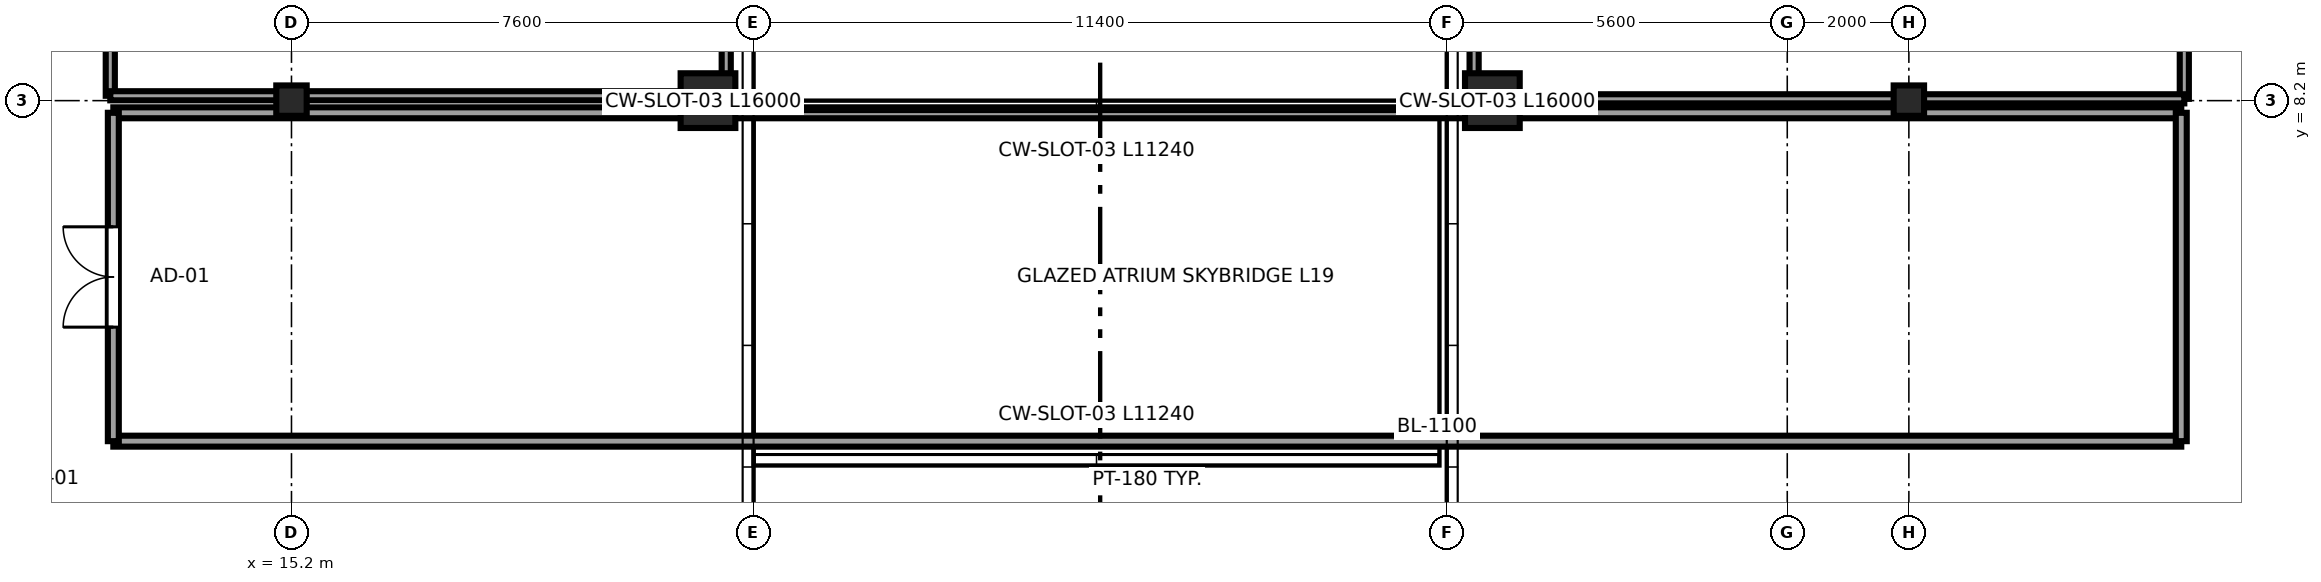
"""IFC4 building model, lengths in metres.
Left out: names, types, materials, properties, quantities, classifications, styles, units other than length and angle.
Written with IfcOpenShell. Run it as: python <this file> out.ifc"""

import sys

from ifc_helpers import new_model, si_unit, direction, frame, frame_2d, origin, origin_2d, place, context, subcontext, project, spatial, rectangle, i_section, extrude, source, transform, mapped, element, fill, save


model = new_model("IFC4")
c1 = context("Model", 3, precision=1e-05, world=origin(), true_north=direction((0.0, 1.0)))
c2 = subcontext(c1, "Body", "Model", "MODEL_VIEW")
j1 = project(units=[si_unit("LENGTHUNIT", "METRE"), si_unit("PLANEANGLEUNIT", "RADIAN")], contexts=[c1])
p1 = place(None, origin())
s1 = spatial("IfcSite", under=j1, at=p1, CompositionType="ELEMENT")
p2 = place(p1, origin())
s2 = spatial("IfcBuilding", under=s1, at=p2, CompositionType="ELEMENT")
p3 = place(p2, frame((0.0, 0.0, 78.15)))
s3 = spatial("IfcBuildingStorey", under=s2, at=p3, CompositionType="ELEMENT", Elevation=78.15)
m1 = source(origin(), c2, "Body", "SweptSolid", [
    extrude(i_section(OverallWidth=0.5, OverallDepth=0.5, WebThickness=0.022, FlangeThickness=0.034, at=origin_2d()), origin(), (0.0, 0.0, 1.0), 3.55),
])
p4 = place(p3, frame((15.2, 8.2, 0.0), z_axis=(0.0, 0.0, 1.0), x_axis=(1.0, 0.0, 0.0)))
e1 = element("IfcColumn", 1, at=p4, inside=s3, PredefinedType="COLUMN", context=c2, shape_type="MappedRepresentation", body=[
    mapped(m1, transform((0.0, 0.0, 0.0), x_axis=(1.0, 0.0, 0.0), y_axis=(0.0, 1.0, 0.0), z_axis=(0.0, 0.0, 1.0), scale=1.0)),
])
m2 = source(origin(), c2, "Body", "SweptSolid", [
    extrude(rectangle(XDim=0.9, YDim=0.9, at=origin_2d()), origin(), (0.0, 0.0, 1.0), 3.55),
])
for number, where, z_axis, x_axis in (
    (2, (22.05, 8.2, 0.0), (0.0, 0.0, 1.0), (1.0, 0.0, 0.0)),
    (3, (34.95, 8.2, 0.0), (0.0, 0.0, 1.0), (1.0, 0.0, 0.0)),
):
    element("IfcColumn", number, at=place(p3, frame(where, z_axis=z_axis, x_axis=x_axis)), inside=s3, PredefinedType="COLUMN", context=c2, shape_type="MappedRepresentation", body=[
        mapped(m2, transform((0.0, 0.0, 0.0), x_axis=(1.0, 0.0, 0.0), y_axis=(0.0, 1.0, 0.0), z_axis=(0.0, 0.0, 1.0), scale=1.0)),
    ])
p5 = place(p3, frame((41.8, 8.2, 0.0), z_axis=(0.0, 0.0, 1.0), x_axis=(1.0, 0.0, 0.0)))
e4 = element("IfcColumn", 4, at=p5, inside=s3, PredefinedType="COLUMN", context=c2, shape_type="MappedRepresentation", body=[
    mapped(m1, transform((0.0, 0.0, 0.0), x_axis=(1.0, 0.0, 0.0), y_axis=(0.0, 1.0, 0.0), z_axis=(0.0, 0.0, 1.0), scale=1.0)),
])
p6 = place(p3, frame((12.22, 8.28, 0.0), z_axis=(0.0, 0.0, 1.0), x_axis=(0.0, 1.0, 0.0)))
e5 = element("IfcWall", 5, at=p6, inside=s3, PredefinedType="PARTITIONING", context=c2, shape_type="SweptSolid", body=[
    extrude(rectangle(XDim=3.91, YDim=0.15, at=frame_2d((1.955, 0.0))), origin(), (0.0, 0.0, 1.0), 3.37),
])
p7 = place(p6, frame((1.445, 0.0, 0.0)))
e6 = element("IfcOpeningElement", 6, at=p7, cuts=e5, PredefinedType="OPENING", context=c2, shape_type="SweptSolid", body=[
    extrude(rectangle(XDim=0.98, YDim=2.12, at=frame_2d((0.49, 1.06))), frame((0.0, 0.085, 0.0), z_axis=(0.0, -1.0, 0.0), x_axis=(1.0, 0.0, 0.0)), (0.0, 0.0, 1.0), 0.17),
])
p8 = place(p3, frame((12.22, 8.28, 0.0), z_axis=(0.0, 0.0, 1.0), x_axis=(1.0, 0.0, 0.0)))
e7 = element("IfcWall", 7, at=p8, inside=s3, PredefinedType="PARTITIONING", context=c2, shape_type="SweptSolid", body=[
    extrude(rectangle(XDim=10.13, YDim=0.15, at=frame_2d((5.065, 0.0))), origin(), (0.0, 0.0, 1.0), 2.748),
])
p9 = place(p3, frame((22.35, 8.28, 0.0), z_axis=(0.0, 0.0, 1.0), x_axis=(0.0, 1.0, 0.0)))
e8 = element("IfcWall", 8, at=p9, inside=s3, PredefinedType="PARTITIONING", context=c2, shape_type="SweptSolid", body=[
    extrude(rectangle(XDim=6.24, YDim=0.15, at=frame_2d((3.12, 0.0))), origin(), (0.0, 0.0, 1.0), 3.37),
])
p10 = place(p3, frame((46.33, 8.23, 0.0), z_axis=(0.0, 0.0, 1.0), x_axis=(0.0, 1.0, 0.0)))
e9 = element("IfcWall", 9, at=p10, inside=s3, PredefinedType="PARTITIONING", context=c2, shape_type="SweptSolid", body=[
    extrude(rectangle(XDim=4.36, YDim=0.15, at=frame_2d((2.18, 0.0))), origin(), (0.0, 0.0, 1.0), 3.37),
])
p11 = place(p10, frame((1.67, 0.0, 0.0)))
e10 = element("IfcOpeningElement", 10, at=p11, cuts=e9, PredefinedType="OPENING", context=c2, shape_type="SweptSolid", body=[
    extrude(rectangle(XDim=0.98, YDim=2.12, at=frame_2d((0.49, 1.06))), frame((0.0, 0.085, 0.0), z_axis=(0.0, -1.0, 0.0), x_axis=(1.0, 0.0, 0.0)), (0.0, 0.0, 1.0), 0.17),
])
p12 = place(p3, frame((34.65, 8.23, 0.0), z_axis=(0.0, 0.0, 1.0), x_axis=(1.0, 0.0, 0.0)))
e11 = element("IfcWall", 11, at=p12, inside=s3, PredefinedType="PARTITIONING", context=c2, shape_type="SweptSolid", body=[
    extrude(rectangle(XDim=11.68, YDim=0.15, at=frame_2d((5.84, 0.0))), origin(), (0.0, 0.0, 1.0), 2.748),
])
p13 = place(p3, frame((34.65, 8.23, 0.0), z_axis=(0.0, 0.0, 1.0), x_axis=(0.0, 1.0, 0.0)))
e12 = element("IfcWall", 12, at=p13, inside=s3, PredefinedType="PARTITIONING", context=c2, shape_type="SweptSolid", body=[
    extrude(rectangle(XDim=6.69, YDim=0.15, at=frame_2d((3.345, 0.0))), origin(), (0.0, 0.0, 1.0), 3.37),
])
for number, where, z_axis, x_axis in (
    (13, (12.27, 2.6, 0.0), (0.0, 0.0, 1.0), (1.0, 0.0, 0.0)),
    (14, (12.27, 8.0, 0.0), (0.0, 0.0, 1.0), (1.0, 0.0, 0.0)),
):
    element("IfcWall", number, at=place(p3, frame(where, z_axis=z_axis, x_axis=x_axis)), inside=s3, PredefinedType="PARTITIONING", context=c2, shape_type="SweptSolid", body=[
        extrude(rectangle(XDim=34.01, YDim=0.18, at=frame_2d((17.005, 0.0))), origin(), (0.0, 0.0, 1.0), 3.37),
    ])
p14 = place(p3, frame((12.27, 2.6, 0.0), z_axis=(0.0, 0.0, 1.0), x_axis=(0.0, 1.0, 0.0)))
e15 = element("IfcWall", 15, at=p14, inside=s3, PredefinedType="PARTITIONING", context=c2, shape_type="SweptSolid", body=[
    extrude(rectangle(XDim=5.4, YDim=0.18, at=frame_2d((2.7, 0.0))), origin(), (0.0, 0.0, 1.0), 3.37),
])
p15 = place(p14, frame((1.875, 0.0, 0.0)))
e16 = element("IfcOpeningElement", 16, at=p15, cuts=e15, PredefinedType="OPENING", context=c2, shape_type="SweptSolid", body=[
    extrude(rectangle(XDim=1.65, YDim=2.15, at=frame_2d((0.825, 1.075))), frame((0.0, 0.1, 0.0), z_axis=(0.0, -1.0, 0.0), x_axis=(1.0, 0.0, 0.0)), (0.0, 0.0, 1.0), 0.2),
])
p16 = place(p3, frame((46.28, 2.6, 0.0), z_axis=(0.0, 0.0, 1.0), x_axis=(0.0, 1.0, 0.0)))
e17 = element("IfcWall", 17, at=p16, inside=s3, PredefinedType="PARTITIONING", context=c2, shape_type="SweptSolid", body=[
    extrude(rectangle(XDim=5.4, YDim=0.18, at=frame_2d((2.7, 0.0))), origin(), (0.0, 0.0, 1.0), 3.37),
])
m3 = source(origin(), c2, "Body", "SweptSolid", [
    extrude(rectangle(XDim=1.65, YDim=2.15, at=frame_2d((0.825, 1.075))), frame((0.0, 0.025, 0.0), z_axis=(0.0, -1.0, 0.0), x_axis=(1.0, 0.0, 0.0)), (0.0, 0.0, 1.0), 0.05),
])
p17 = place(p15, origin())
e18 = element("IfcDoor", 18, at=p17, inside=s3, OperationType="DOUBLE_DOOR_SINGLE_SWING", PredefinedType="DOOR", context=c2, shape_type="MappedRepresentation", body=[
    mapped(m3, transform((0.0, 0.0, 0.0), x_axis=(1.0, 0.0, 0.0), y_axis=(0.0, 1.0, 0.0), z_axis=(0.0, 0.0, 1.0), scale=1.0)),
])
fill(e16, e18)
save(model, sys.argv[1])
